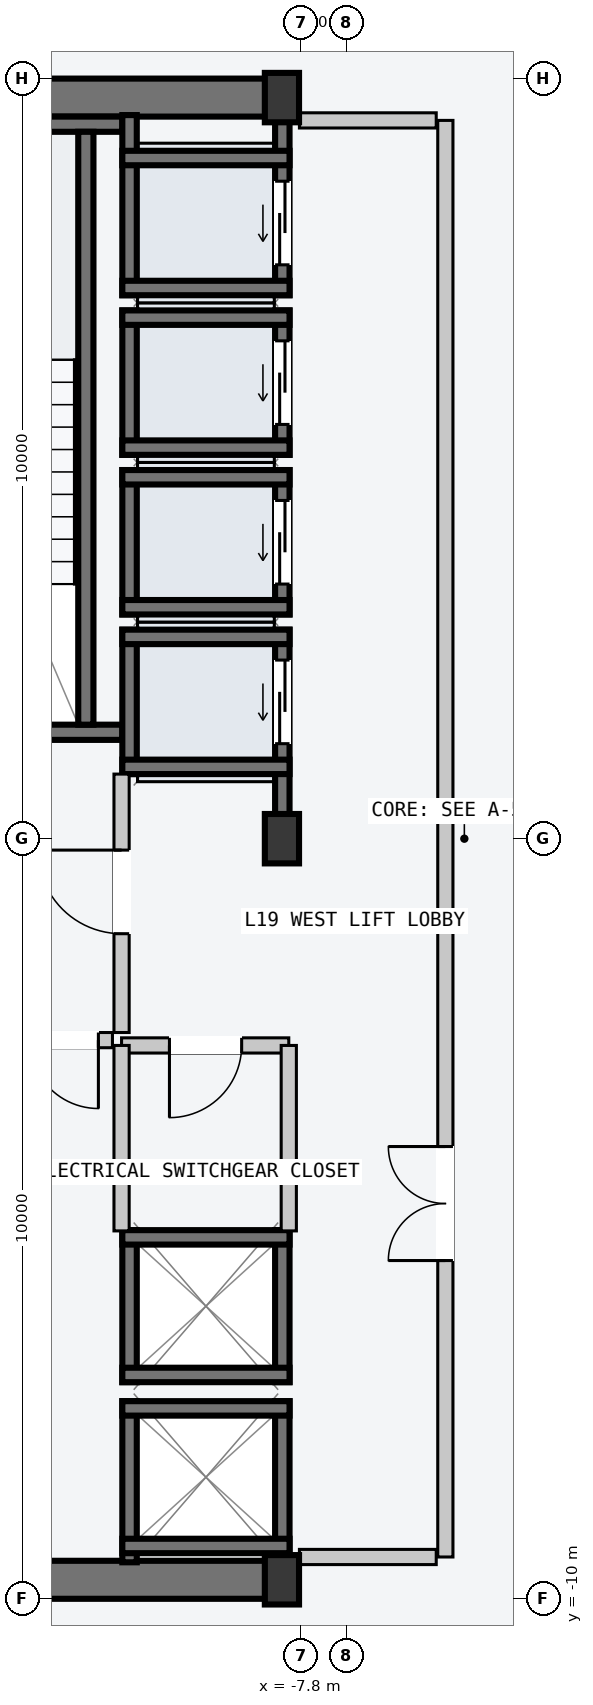
"""IFC4 building model, lengths in metres.
Left out: names, types, materials, properties, quantities, classifications, styles, units other than length and angle.
Written with IfcOpenShell. Run it as: python <this file> out.ifc"""

import sys

from ifc_helpers import new_model, si_unit, direction, frame, frame_2d, origin, origin_2d, place, context, subcontext, project, spatial, rectangle, i_section, extrude, element, fill, save


model = new_model("IFC4")
c1 = context("Model", 3, precision=1e-05, world=origin(), true_north=direction((0.0, 1.0)))
c2 = subcontext(c1, "Body", "Model", "MODEL_VIEW")
j1 = project(units=[si_unit("LENGTHUNIT", "METRE"), si_unit("PLANEANGLEUNIT", "RADIAN")], contexts=[c1])
p1 = place(None, origin())
s1 = spatial("IfcSite", under=j1, at=p1, CompositionType="ELEMENT")
p2 = place(p1, origin())
s2 = spatial("IfcBuilding", under=s1, at=p2, CompositionType="ELEMENT")
p3 = place(p2, frame((0.0, 0.0, 74.4)))
s3 = spatial("IfcBuildingStorey", under=s2, at=p3, CompositionType="ELEMENT", Elevation=74.4)
for number, where, z_axis, x_axis in (
    (1, (-14.53, -9.75, -0.2), (0.0, 0.0, 1.0), (1.0, 0.0, 0.0)),
    (2, (-14.53, 9.75, -0.2), (0.0, 0.0, 1.0), (1.0, 0.0, 0.0)),
):
    element("IfcWall", number, at=place(p3, frame(where, z_axis=z_axis, x_axis=x_axis)), inside=s3, PredefinedType="SHEAR", context=c2, shape_type="SweptSolid", body=[
        extrude(rectangle(XDim=6.46, YDim=0.5, at=frame_2d((3.23, 0.0))), origin(), (0.0, 0.0, 1.0), 3.6),
    ])
p4 = place(p3, frame((-14.25, 1.4, -0.2), z_axis=(0.0, 0.0, 1.0), x_axis=(1.0, 0.0, 0.0)))
e3 = element("IfcWall", 3, at=p4, inside=s3, PredefinedType="SOLIDWALL", context=c2, shape_type="SweptSolid", body=[
    extrude(rectangle(XDim=4.1, YDim=0.2, at=frame_2d((2.05, 0.0))), origin(), (0.0, 0.0, 1.0), 3.6),
])
p5 = place(p4, frame((1.5, 0.0, 0.2)))
e4 = element("IfcOpeningElement", 4, at=p5, cuts=e3, PredefinedType="OPENING", context=c2, shape_type="SweptSolid", body=[
    extrude(rectangle(XDim=1.12, YDim=2.18, at=frame_2d((0.56, 1.09))), frame((0.0, 0.11, 0.0), z_axis=(0.0, -1.0, 0.0), x_axis=(1.0, 0.0, 0.0)), (0.0, 0.0, 1.0), 0.22),
])
p6 = place(p3, frame((-14.25, 9.4, -0.2), z_axis=(0.0, 0.0, 1.0), x_axis=(1.0, 0.0, 0.0)))
e5 = element("IfcWall", 5, at=p6, inside=s3, PredefinedType="SOLIDWALL", context=c2, shape_type="SweptSolid", body=[
    extrude(rectangle(XDim=4.1, YDim=0.2, at=frame_2d((2.05, 0.0))), origin(), (0.0, 0.0, 1.0), 3.6),
])
p7 = place(p3, frame((-10.63, 1.5, -0.2), z_axis=(0.0, 0.0, 1.0), x_axis=(0.0, 1.0, 0.0)))
e6 = element("IfcWall", 6, at=p7, inside=s3, PredefinedType="SOLIDWALL", context=c2, shape_type="SweptSolid", body=[
    extrude(rectangle(XDim=7.8, YDim=0.2, at=frame_2d((3.9, 0.0))), origin(), (0.0, 0.0, 1.0), 3.6),
])
for number, where, z_axis, x_axis in (
    (7, (-8.05, -9.75, 0.0), (0.0, 0.0, 1.0), (1.0, 0.0, 0.0)),
    (8, (-8.05, 0.0, 0.0), (0.0, 0.0, 1.0), (1.0, 0.0, 0.0)),
    (9, (-8.05, 9.75, 0.0), (0.0, 0.0, 1.0), (1.0, 0.0, 0.0)),
):
    element("IfcColumn", number, at=place(p3, frame(where, z_axis=z_axis, x_axis=x_axis)), inside=s3, PredefinedType="COLUMN", context=c2, shape_type="SweptSolid", body=[
        extrude(i_section(OverallWidth=0.45, OverallDepth=0.65, WebThickness=0.025, FlangeThickness=0.04, at=origin_2d()), origin(), (0.0, 0.0, 1.0), 3.6),
    ])
p8 = place(p3, frame((-8.045, 0.21, -0.2), z_axis=(0.0, 0.0, 1.0), x_axis=(0.0, 1.0, 0.0)))
e10 = element("IfcWall", 10, at=p8, inside=s3, PredefinedType="SOLIDWALL", context=c2, shape_type="SweptSolid", body=[
    extrude(rectangle(XDim=2.54, YDim=0.19, at=frame_2d((1.27, 0.0))), origin(), (0.0, 0.0, 1.0), 3.6),
])
p9 = place(p8, frame((1.04, 0.0, 0.2)))
e11 = element("IfcOpeningElement", 11, at=p9, cuts=e10, PredefinedType="OPENING", context=c2, shape_type="SweptSolid", body=[
    extrude(rectangle(XDim=1.1, YDim=2.2, at=frame_2d((0.55, 1.1))), frame((0.0, 0.105, 0.0), z_axis=(0.0, -1.0, 0.0), x_axis=(1.0, 0.0, 0.0)), (0.0, 0.0, 1.0), 0.21),
])
p10 = place(p3, frame((-10.055, 0.85, -0.2), z_axis=(0.0, 0.0, 1.0), x_axis=(0.0, 1.0, 0.0)))
e12 = element("IfcWall", 12, at=p10, inside=s3, PredefinedType="SOLIDWALL", context=c2, shape_type="SweptSolid", body=[
    extrude(rectangle(XDim=1.9, YDim=0.19, at=frame_2d((0.95, 0.0))), origin(), (0.0, 0.0, 1.0), 3.6),
])
for number, where, z_axis, x_axis in (
    (13, (-10.15, 2.655, -0.2), (0.0, 0.0, 1.0), (1.0, 0.0, 0.0)),
    (14, (-10.15, 0.945, -0.2), (0.0, 0.0, 1.0), (1.0, 0.0, 0.0)),
):
    element("IfcWall", number, at=place(p3, frame(where, z_axis=z_axis, x_axis=x_axis)), inside=s3, PredefinedType="SOLIDWALL", context=c2, shape_type="SweptSolid", body=[
        extrude(rectangle(XDim=2.2, YDim=0.19, at=frame_2d((1.1, 0.0))), origin(), (0.0, 0.0, 1.0), 3.6),
    ])
p11 = place(p3, frame((-8.045, 2.95, -0.2), z_axis=(0.0, 0.0, 1.0), x_axis=(0.0, 1.0, 0.0)))
e15 = element("IfcWall", 15, at=p11, inside=s3, PredefinedType="SOLIDWALL", context=c2, shape_type="SweptSolid", body=[
    extrude(rectangle(XDim=1.9, YDim=0.19, at=frame_2d((0.95, 0.0))), origin(), (0.0, 0.0, 1.0), 3.6),
])
p12 = place(p11, frame((0.4, 0.0, 0.2)))
e16 = element("IfcOpeningElement", 16, at=p12, cuts=e15, PredefinedType="OPENING", context=c2, shape_type="SweptSolid", body=[
    extrude(rectangle(XDim=1.1, YDim=2.2, at=frame_2d((0.55, 1.1))), frame((0.0, 0.105, 0.0), z_axis=(0.0, -1.0, 0.0), x_axis=(1.0, 0.0, 0.0)), (0.0, 0.0, 1.0), 0.21),
])
p13 = place(p3, frame((-10.055, 2.95, -0.2), z_axis=(0.0, 0.0, 1.0), x_axis=(0.0, 1.0, 0.0)))
e17 = element("IfcWall", 17, at=p13, inside=s3, PredefinedType="SOLIDWALL", context=c2, shape_type="SweptSolid", body=[
    extrude(rectangle(XDim=1.9, YDim=0.19, at=frame_2d((0.95, 0.0))), origin(), (0.0, 0.0, 1.0), 3.6),
])
for number, where, z_axis, x_axis in (
    (18, (-10.15, 4.755, -0.2), (0.0, 0.0, 1.0), (1.0, 0.0, 0.0)),
    (19, (-10.15, 3.045, -0.2), (0.0, 0.0, 1.0), (1.0, 0.0, 0.0)),
):
    element("IfcWall", number, at=place(p3, frame(where, z_axis=z_axis, x_axis=x_axis)), inside=s3, PredefinedType="SOLIDWALL", context=c2, shape_type="SweptSolid", body=[
        extrude(rectangle(XDim=2.2, YDim=0.19, at=frame_2d((1.1, 0.0))), origin(), (0.0, 0.0, 1.0), 3.6),
    ])
p14 = place(p3, frame((-8.045, 5.05, -0.2), z_axis=(0.0, 0.0, 1.0), x_axis=(0.0, 1.0, 0.0)))
e20 = element("IfcWall", 20, at=p14, inside=s3, PredefinedType="SOLIDWALL", context=c2, shape_type="SweptSolid", body=[
    extrude(rectangle(XDim=1.9, YDim=0.19, at=frame_2d((0.95, 0.0))), origin(), (0.0, 0.0, 1.0), 3.6),
])
p15 = place(p14, frame((0.4, 0.0, 0.2)))
e21 = element("IfcOpeningElement", 21, at=p15, cuts=e20, PredefinedType="OPENING", context=c2, shape_type="SweptSolid", body=[
    extrude(rectangle(XDim=1.1, YDim=2.2, at=frame_2d((0.55, 1.1))), frame((0.0, 0.105, 0.0), z_axis=(0.0, -1.0, 0.0), x_axis=(1.0, 0.0, 0.0)), (0.0, 0.0, 1.0), 0.21),
])
p16 = place(p3, frame((-10.055, 5.05, -0.2), z_axis=(0.0, 0.0, 1.0), x_axis=(0.0, 1.0, 0.0)))
e22 = element("IfcWall", 22, at=p16, inside=s3, PredefinedType="SOLIDWALL", context=c2, shape_type="SweptSolid", body=[
    extrude(rectangle(XDim=1.9, YDim=0.19, at=frame_2d((0.95, 0.0))), origin(), (0.0, 0.0, 1.0), 3.6),
])
for number, where, z_axis, x_axis in (
    (23, (-10.15, 6.855, -0.2), (0.0, 0.0, 1.0), (1.0, 0.0, 0.0)),
    (24, (-10.15, 5.145, -0.2), (0.0, 0.0, 1.0), (1.0, 0.0, 0.0)),
):
    element("IfcWall", number, at=place(p3, frame(where, z_axis=z_axis, x_axis=x_axis)), inside=s3, PredefinedType="SOLIDWALL", context=c2, shape_type="SweptSolid", body=[
        extrude(rectangle(XDim=2.2, YDim=0.19, at=frame_2d((1.1, 0.0))), origin(), (0.0, 0.0, 1.0), 3.6),
    ])
p17 = place(p3, frame((-8.045, 7.15, -0.2), z_axis=(0.0, 0.0, 1.0), x_axis=(0.0, 1.0, 0.0)))
e25 = element("IfcWall", 25, at=p17, inside=s3, PredefinedType="SOLIDWALL", context=c2, shape_type="SweptSolid", body=[
    extrude(rectangle(XDim=2.37, YDim=0.19, at=frame_2d((1.185, 0.0))), origin(), (0.0, 0.0, 1.0), 3.6),
])
p18 = place(p17, frame((0.4, 0.0, 0.2)))
e26 = element("IfcOpeningElement", 26, at=p18, cuts=e25, PredefinedType="OPENING", context=c2, shape_type="SweptSolid", body=[
    extrude(rectangle(XDim=1.1, YDim=2.2, at=frame_2d((0.55, 1.1))), frame((0.0, 0.105, 0.0), z_axis=(0.0, -1.0, 0.0), x_axis=(1.0, 0.0, 0.0)), (0.0, 0.0, 1.0), 0.21),
])
p19 = place(p3, frame((-10.055, 7.15, -0.2), z_axis=(0.0, 0.0, 1.0), x_axis=(0.0, 1.0, 0.0)))
e27 = element("IfcWall", 27, at=p19, inside=s3, PredefinedType="SOLIDWALL", context=c2, shape_type="SweptSolid", body=[
    extrude(rectangle(XDim=2.37, YDim=0.19, at=frame_2d((1.185, 0.0))), origin(), (0.0, 0.0, 1.0), 3.6),
])
for number, where, z_axis, x_axis in (
    (28, (-10.15, 8.955, -0.2), (0.0, 0.0, 1.0), (1.0, 0.0, 0.0)),
    (29, (-10.15, 7.245, -0.2), (0.0, 0.0, 1.0), (1.0, 0.0, 0.0)),
):
    element("IfcWall", number, at=place(p3, frame(where, z_axis=z_axis, x_axis=x_axis)), inside=s3, PredefinedType="SOLIDWALL", context=c2, shape_type="SweptSolid", body=[
        extrude(rectangle(XDim=2.2, YDim=0.19, at=frame_2d((1.1, 0.0))), origin(), (0.0, 0.0, 1.0), 3.6),
    ])
for number, where, z_axis, x_axis in (
    (30, (-8.045, -9.52, -0.2), (0.0, 0.0, 1.0), (0.0, 1.0, 0.0)),
    (31, (-10.055, -9.52, -0.2), (0.0, 0.0, 1.0), (0.0, 1.0, 0.0)),
):
    element("IfcWall", number, at=place(p3, frame(where, z_axis=z_axis, x_axis=x_axis)), inside=s3, PredefinedType="SOLIDWALL", context=c2, shape_type="SweptSolid", body=[
        extrude(rectangle(XDim=2.12, YDim=0.19, at=frame_2d((1.06, 0.0))), origin(), (0.0, 0.0, 1.0), 3.6),
    ])
for number, where, z_axis, x_axis in (
    (32, (-10.15, -7.495, -0.2), (0.0, 0.0, 1.0), (1.0, 0.0, 0.0)),
    (33, (-10.15, -9.305, -0.2), (0.0, 0.0, 1.0), (1.0, 0.0, 0.0)),
):
    element("IfcWall", number, at=place(p3, frame(where, z_axis=z_axis, x_axis=x_axis)), inside=s3, PredefinedType="SOLIDWALL", context=c2, shape_type="SweptSolid", body=[
        extrude(rectangle(XDim=2.2, YDim=0.19, at=frame_2d((1.1, 0.0))), origin(), (0.0, 0.0, 1.0), 3.6),
    ])
for number, where, z_axis, x_axis in (
    (34, (-8.045, -7.15, -0.2), (0.0, 0.0, 1.0), (0.0, 1.0, 0.0)),
    (35, (-10.055, -7.15, -0.2), (0.0, 0.0, 1.0), (0.0, 1.0, 0.0)),
):
    element("IfcWall", number, at=place(p3, frame(where, z_axis=z_axis, x_axis=x_axis)), inside=s3, PredefinedType="SOLIDWALL", context=c2, shape_type="SweptSolid", body=[
        extrude(rectangle(XDim=2.0, YDim=0.19, at=frame_2d((1.0, 0.0))), origin(), (0.0, 0.0, 1.0), 3.6),
    ])
for number, where, z_axis, x_axis in (
    (36, (-10.15, -5.245, -0.2), (0.0, 0.0, 1.0), (1.0, 0.0, 0.0)),
    (37, (-10.15, -7.055, -0.2), (0.0, 0.0, 1.0), (1.0, 0.0, 0.0)),
):
    element("IfcWall", number, at=place(p3, frame(where, z_axis=z_axis, x_axis=x_axis)), inside=s3, PredefinedType="SOLIDWALL", context=c2, shape_type="SweptSolid", body=[
        extrude(rectangle(XDim=2.2, YDim=0.19, at=frame_2d((1.1, 0.0))), origin(), (0.0, 0.0, 1.0), 3.6),
    ])
p20 = place(p3, frame((-5.9, -9.45, 0.0), z_axis=(0.0, 0.0, 1.0), x_axis=(0.0, 1.0, 0.0)))
e38 = element("IfcWall", 38, at=p20, inside=s3, PredefinedType="PARTITIONING", context=c2, shape_type="SweptSolid", body=[
    extrude(rectangle(XDim=18.9, YDim=0.2, at=frame_2d((9.45, 0.0))), origin(), (0.0, 0.0, 1.0), 3.4),
])
p21 = place(p20, frame((3.9, 0.0, 0.0)))
e39 = element("IfcOpeningElement", 39, at=p21, cuts=e38, PredefinedType="OPENING", context=c2, shape_type="SweptSolid", body=[
    extrude(rectangle(XDim=1.5, YDim=2.2, at=frame_2d((0.75, 1.1))), frame((0.0, 0.11, 0.0), z_axis=(0.0, -1.0, 0.0), x_axis=(1.0, 0.0, 0.0)), (0.0, 0.0, 1.0), 0.22),
])
for number, where, z_axis, x_axis in (
    (40, (-6.02, -9.45, 0.0), (0.0, 0.0, 1.0), (-1.0, 0.0, 0.0)),
    (41, (-6.02, 9.45, 0.0), (0.0, 0.0, 1.0), (-1.0, 0.0, 0.0)),
):
    element("IfcWall", number, at=place(p3, frame(where, z_axis=z_axis, x_axis=x_axis)), inside=s3, PredefinedType="PARTITIONING", context=c2, shape_type="SweptSolid", body=[
        extrude(rectangle(XDim=1.8, YDim=0.2, at=frame_2d((0.9, 0.0))), origin(), (0.0, 0.0, 1.0), 3.4),
    ])
p22 = place(p3, frame((-10.16, -2.55, 0.0), z_axis=(0.0, 0.0, 1.0), x_axis=(0.0, 1.0, 0.0)))
e42 = element("IfcWall", 42, at=p22, inside=s3, PredefinedType="PARTITIONING", context=c2, shape_type="SweptSolid", body=[
    extrude(rectangle(XDim=3.4, YDim=0.2, at=frame_2d((1.7, 0.0))), origin(), (0.0, 0.0, 1.0), 3.4),
])
p23 = place(p22, frame((1.3, 0.0, 0.0)))
e43 = element("IfcOpeningElement", 43, at=p23, cuts=e42, PredefinedType="OPENING", context=c2, shape_type="SweptSolid", body=[
    extrude(rectangle(XDim=1.1, YDim=2.15, at=frame_2d((0.55, 1.075))), frame((0.0, 0.11, 0.0), z_axis=(0.0, -1.0, 0.0), x_axis=(1.0, 0.0, 0.0)), (0.0, 0.0, 1.0), 0.22),
])
p24 = place(p3, frame((-10.28, -2.65, 0.0), z_axis=(0.0, 0.0, 1.0), x_axis=(-1.0, 0.0, 0.0)))
e44 = element("IfcWall", 44, at=p24, inside=s3, PredefinedType="PARTITIONING", context=c2, shape_type="SweptSolid", body=[
    extrude(rectangle(XDim=1.27, YDim=0.2, at=frame_2d((0.635, 0.0))), origin(), (0.0, 0.0, 1.0), 3.4),
])
p25 = place(p24, frame((0.185, 0.0, 0.0)))
e45 = element("IfcOpeningElement", 45, at=p25, cuts=e44, PredefinedType="OPENING", context=c2, shape_type="SweptSolid", body=[
    extrude(rectangle(XDim=0.9, YDim=2.15, at=frame_2d((0.45, 1.075))), frame((0.0, 0.11, 0.0), z_axis=(0.0, -1.0, 0.0), x_axis=(1.0, 0.0, 0.0)), (0.0, 0.0, 1.0), 0.22),
])
p26 = place(p3, frame((-7.96, -2.72, 0.0), z_axis=(0.0, 0.0, 1.0), x_axis=(-1.0, 0.0, 0.0)))
e46 = element("IfcWall", 46, at=p26, inside=s3, PredefinedType="PARTITIONING", context=c2, shape_type="SweptSolid", body=[
    extrude(rectangle(XDim=2.2, YDim=0.2, at=frame_2d((1.1, 0.0))), origin(), (0.0, 0.0, 1.0), 3.4),
])
p27 = place(p26, frame((0.62, 0.0, 0.0)))
e47 = element("IfcOpeningElement", 47, at=p27, cuts=e46, PredefinedType="OPENING", context=c2, shape_type="SweptSolid", body=[
    extrude(rectangle(XDim=0.95, YDim=2.1, at=frame_2d((0.475, 1.05))), frame((0.0, 0.11, 0.0), z_axis=(0.0, -1.0, 0.0), x_axis=(1.0, 0.0, 0.0)), (0.0, 0.0, 1.0), 0.22),
])
for number, where, z_axis, x_axis in (
    (48, (-7.96, -5.16, 0.0), (0.0, 0.0, 1.0), (0.0, 1.0, 0.0)),
    (49, (-10.16, -5.16, 0.0), (0.0, 0.0, 1.0), (0.0, 1.0, 0.0)),
):
    element("IfcWall", number, at=place(p3, frame(where, z_axis=z_axis, x_axis=x_axis)), inside=s3, PredefinedType="PARTITIONING", context=c2, shape_type="SweptSolid", body=[
        extrude(rectangle(XDim=2.44, YDim=0.2, at=frame_2d((1.22, 0.0))), origin(), (0.0, 0.0, 1.0), 3.4),
    ])
p28 = place(p9, origin())
e50 = element("IfcDoor", 50, at=p28, inside=s3, OperationType="SLIDING_TO_LEFT", PredefinedType="DOOR", context=c2, shape_type="SweptSolid", body=[
    extrude(rectangle(XDim=1.1, YDim=2.2, at=frame_2d((0.55, 1.1))), frame((0.0, 0.025, 0.0), z_axis=(0.0, -1.0, 0.0), x_axis=(1.0, 0.0, 0.0)), (0.0, 0.0, 1.0), 0.05),
])
fill(e11, e50)
p29 = place(p12, origin())
e51 = element("IfcDoor", 51, at=p29, inside=s3, OperationType="SLIDING_TO_LEFT", PredefinedType="DOOR", context=c2, shape_type="SweptSolid", body=[
    extrude(rectangle(XDim=1.1, YDim=2.2, at=frame_2d((0.55, 1.1))), frame((0.0, 0.025, 0.0), z_axis=(0.0, -1.0, 0.0), x_axis=(1.0, 0.0, 0.0)), (0.0, 0.0, 1.0), 0.05),
])
fill(e16, e51)
p30 = place(p15, origin())
e52 = element("IfcDoor", 52, at=p30, inside=s3, OperationType="SLIDING_TO_LEFT", PredefinedType="DOOR", context=c2, shape_type="SweptSolid", body=[
    extrude(rectangle(XDim=1.1, YDim=2.2, at=frame_2d((0.55, 1.1))), frame((0.0, 0.025, 0.0), z_axis=(0.0, -1.0, 0.0), x_axis=(1.0, 0.0, 0.0)), (0.0, 0.0, 1.0), 0.05),
])
fill(e21, e52)
p31 = place(p18, origin())
e53 = element("IfcDoor", 53, at=p31, inside=s3, OperationType="SLIDING_TO_LEFT", PredefinedType="DOOR", context=c2, shape_type="SweptSolid", body=[
    extrude(rectangle(XDim=1.1, YDim=2.2, at=frame_2d((0.55, 1.1))), frame((0.0, 0.025, 0.0), z_axis=(0.0, -1.0, 0.0), x_axis=(1.0, 0.0, 0.0)), (0.0, 0.0, 1.0), 0.05),
])
fill(e26, e53)
p32 = place(p21, origin())
e54 = element("IfcDoor", 54, at=p32, inside=s3, OperationType="DOUBLE_DOOR_SINGLE_SWING", PredefinedType="DOOR", context=c2, shape_type="SweptSolid", body=[
    extrude(rectangle(XDim=1.5, YDim=2.2, at=frame_2d((0.75, 1.1))), frame((0.0, 0.025, 0.0), z_axis=(0.0, -1.0, 0.0), x_axis=(1.0, 0.0, 0.0)), (0.0, 0.0, 1.0), 0.05),
])
fill(e39, e54)
p33 = place(p23, origin())
e55 = element("IfcDoor", 55, at=p33, inside=s3, OperationType="SINGLE_SWING_RIGHT", PredefinedType="DOOR", context=c2, shape_type="SweptSolid", body=[
    extrude(rectangle(XDim=1.1, YDim=2.15, at=frame_2d((0.55, 1.075))), frame((0.0, 0.025, 0.0), z_axis=(0.0, -1.0, 0.0), x_axis=(1.0, 0.0, 0.0)), (0.0, 0.0, 1.0), 0.05),
])
fill(e43, e55)
p34 = place(p25, origin())
e56 = element("IfcDoor", 56, at=p34, inside=s3, OperationType="SINGLE_SWING_LEFT", PredefinedType="DOOR", context=c2, shape_type="SweptSolid", body=[
    extrude(rectangle(XDim=0.9, YDim=2.15, at=frame_2d((0.45, 1.075))), frame((0.0, 0.025, 0.0), z_axis=(0.0, -1.0, 0.0), x_axis=(1.0, 0.0, 0.0)), (0.0, 0.0, 1.0), 0.05),
])
fill(e45, e56)
p35 = place(p27, origin())
e57 = element("IfcDoor", 57, at=p35, inside=s3, OperationType="SINGLE_SWING_RIGHT", PredefinedType="DOOR", context=c2, shape_type="SweptSolid", body=[
    extrude(rectangle(XDim=0.95, YDim=2.1, at=frame_2d((0.475, 1.05))), frame((0.0, 0.025, 0.0), z_axis=(0.0, -1.0, 0.0), x_axis=(1.0, 0.0, 0.0)), (0.0, 0.0, 1.0), 0.05),
])
fill(e47, e57)
save(model, sys.argv[1])
